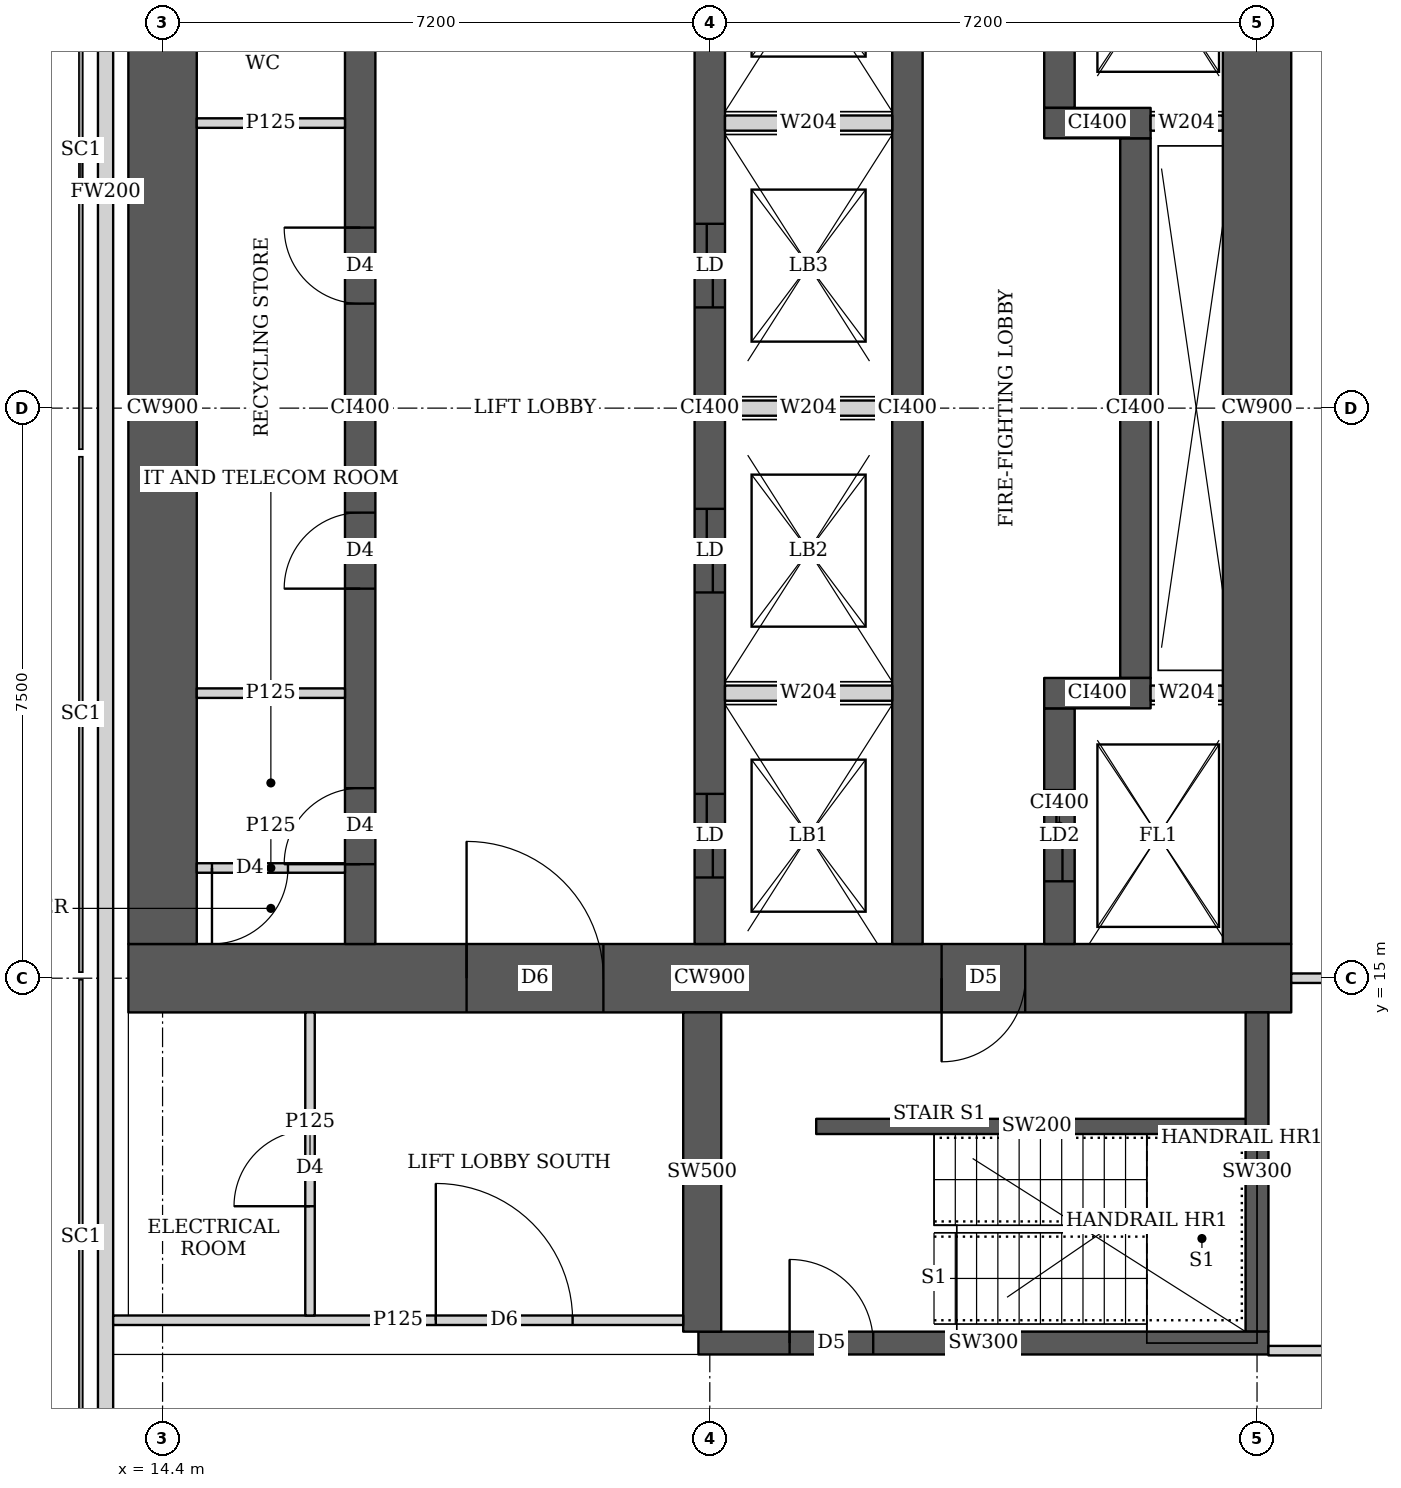
"""IFC4 building model, lengths in metres.
Left out: names, types, materials, properties, quantities, classifications, styles, units other than length and angle.
Written with IfcOpenShell. Run it as: python <this file> out.ifc"""

import sys

from ifc_helpers import new_model, si_unit, direction, frame, frame_2d, origin, place, context, subcontext, project, spatial, rectangle, extrude, element, fill, save


model = new_model("IFC4")
c1 = context("Model", 3, precision=1e-05, world=origin(), true_north=direction((0.0, 1.0)))
c2 = subcontext(c1, "Body", "Model", "MODEL_VIEW")
j1 = project(units=[si_unit("LENGTHUNIT", "METRE"), si_unit("PLANEANGLEUNIT", "RADIAN")], contexts=[c1])
p1 = place(None, origin())
s1 = spatial("IfcSite", under=j1, at=p1, CompositionType="ELEMENT")
p2 = place(p1, origin())
s2 = spatial("IfcBuilding", under=s1, at=p2, CompositionType="ELEMENT")
p3 = place(p2, frame((0.0, 0.0, 285.35)))
s3 = spatial("IfcBuildingStorey", under=s2, at=p3, CompositionType="ELEMENT", Elevation=285.35)
p4 = place(p3, frame((13.95, 15.0, 0.0), z_axis=(0.0, 0.0, 1.0), x_axis=(1.0, 0.0, 0.0)))
e1 = element("IfcWall", 1, at=p4, inside=s3, PredefinedType="SHEAR", context=c2, shape_type="SweptSolid", body=[
    extrude(rectangle(XDim=15.3, YDim=0.9, at=frame_2d((7.65, 0.0))), origin(), (0.0, 0.0, 1.0), 3.75),
])
p5 = place(p4, frame((4.45, 0.0, 0.0)))
e2 = element("IfcOpeningElement", 2, at=p5, cuts=e1, PredefinedType="OPENING", context=c2, shape_type="SweptSolid", body=[
    extrude(rectangle(XDim=1.8, YDim=2.1, at=frame_2d((0.9, 1.05))), frame((0.0, 0.46, 0.0), z_axis=(0.0, -1.0, 0.0), x_axis=(1.0, 0.0, 0.0)), (0.0, 0.0, 1.0), 0.92),
])
p6 = place(p4, frame((10.7, 0.0, 0.0)))
e3 = element("IfcOpeningElement", 3, at=p6, cuts=e1, PredefinedType="OPENING", context=c2, shape_type="SweptSolid", body=[
    extrude(rectangle(XDim=1.1, YDim=2.1, at=frame_2d((0.55, 1.05))), frame((0.0, 0.46, 0.0), z_axis=(0.0, -1.0, 0.0), x_axis=(1.0, 0.0, 0.0)), (0.0, 0.0, 1.0), 0.92),
])
for number, where, z_axis, x_axis in (
    (4, (14.4, 15.45, 0.0), (0.0, 0.0, 1.0), (0.0, 1.0, 0.0)),
    (5, (28.8, 15.45, 0.0), (0.0, 0.0, 1.0), (0.0, 1.0, 0.0)),
):
    element("IfcWall", number, at=place(p3, frame(where, z_axis=z_axis, x_axis=x_axis)), inside=s3, PredefinedType="SHEAR", context=c2, shape_type="SweptSolid", body=[
        extrude(rectangle(XDim=14.1, YDim=0.9, at=frame_2d((7.05, 0.0))), origin(), (0.0, 0.0, 1.0), 3.75),
    ])
p7 = place(p3, frame((17.0, 15.45, 0.0), z_axis=(0.0, 0.0, 1.0), x_axis=(0.0, 1.0, 0.0)))
e6 = element("IfcWall", 6, at=p7, inside=s3, PredefinedType="SHEAR", context=c2, shape_type="SweptSolid", body=[
    extrude(rectangle(XDim=14.1, YDim=0.4, at=frame_2d((7.05, 0.0))), origin(), (0.0, 0.0, 1.0), 3.75),
])
p8 = place(p7, frame((1.05, 0.0, 0.0)))
e7 = element("IfcOpeningElement", 7, at=p8, cuts=e6, PredefinedType="OPENING", context=c2, shape_type="SweptSolid", body=[
    extrude(rectangle(XDim=1.0, YDim=2.1, at=frame_2d((0.5, 1.05))), frame((0.0, 0.21, 0.0), z_axis=(0.0, -1.0, 0.0), x_axis=(1.0, 0.0, 0.0)), (0.0, 0.0, 1.0), 0.42),
])
p9 = place(p7, frame((4.675, 0.0, 0.0)))
e8 = element("IfcOpeningElement", 8, at=p9, cuts=e6, PredefinedType="OPENING", context=c2, shape_type="SweptSolid", body=[
    extrude(rectangle(XDim=1.0, YDim=2.1, at=frame_2d((0.5, 1.05))), frame((0.0, 0.21, 0.0), z_axis=(0.0, -1.0, 0.0), x_axis=(1.0, 0.0, 0.0)), (0.0, 0.0, 1.0), 0.42),
])
p10 = place(p7, frame((8.425, 0.0, 0.0)))
e9 = element("IfcOpeningElement", 9, at=p10, cuts=e6, PredefinedType="OPENING", context=c2, shape_type="SweptSolid", body=[
    extrude(rectangle(XDim=1.0, YDim=2.1, at=frame_2d((0.5, 1.05))), frame((0.0, 0.21, 0.0), z_axis=(0.0, -1.0, 0.0), x_axis=(1.0, 0.0, 0.0)), (0.0, 0.0, 1.0), 0.42),
])
p11 = place(p7, frame((12.175, 0.0, 0.0)))
e10 = element("IfcOpeningElement", 10, at=p11, cuts=e6, PredefinedType="OPENING", context=c2, shape_type="SweptSolid", body=[
    extrude(rectangle(XDim=1.0, YDim=2.1, at=frame_2d((0.5, 1.05))), frame((0.0, 0.21, 0.0), z_axis=(0.0, -1.0, 0.0), x_axis=(1.0, 0.0, 0.0)), (0.0, 0.0, 1.0), 0.42),
])
p12 = place(p3, frame((21.6, 15.45, 0.0), z_axis=(0.0, 0.0, 1.0), x_axis=(0.0, 1.0, 0.0)))
e11 = element("IfcWall", 11, at=p12, inside=s3, PredefinedType="SHEAR", context=c2, shape_type="SweptSolid", body=[
    extrude(rectangle(XDim=14.1, YDim=0.4, at=frame_2d((7.05, 0.0))), origin(), (0.0, 0.0, 1.0), 3.75),
])
p13 = place(p12, frame((0.875, 0.0, 0.0)))
e12 = element("IfcOpeningElement", 12, at=p13, cuts=e11, PredefinedType="OPENING", context=c2, shape_type="SweptSolid", body=[
    extrude(rectangle(XDim=1.1, YDim=2.1, at=frame_2d((0.55, 1.05))), frame((0.0, 0.21, 0.0), z_axis=(0.0, -1.0, 0.0), x_axis=(1.0, 0.0, 0.0)), (0.0, 0.0, 1.0), 0.42),
])
p14 = place(p12, frame((4.625, 0.0, 0.0)))
e13 = element("IfcOpeningElement", 13, at=p14, cuts=e11, PredefinedType="OPENING", context=c2, shape_type="SweptSolid", body=[
    extrude(rectangle(XDim=1.1, YDim=2.1, at=frame_2d((0.55, 1.05))), frame((0.0, 0.21, 0.0), z_axis=(0.0, -1.0, 0.0), x_axis=(1.0, 0.0, 0.0)), (0.0, 0.0, 1.0), 0.42),
])
p15 = place(p12, frame((8.375, 0.0, 0.0)))
e14 = element("IfcOpeningElement", 14, at=p15, cuts=e11, PredefinedType="OPENING", context=c2, shape_type="SweptSolid", body=[
    extrude(rectangle(XDim=1.1, YDim=2.1, at=frame_2d((0.55, 1.05))), frame((0.0, 0.21, 0.0), z_axis=(0.0, -1.0, 0.0), x_axis=(1.0, 0.0, 0.0)), (0.0, 0.0, 1.0), 0.42),
])
p16 = place(p12, frame((12.125, 0.0, 0.0)))
e15 = element("IfcOpeningElement", 15, at=p16, cuts=e11, PredefinedType="OPENING", context=c2, shape_type="SweptSolid", body=[
    extrude(rectangle(XDim=1.1, YDim=2.1, at=frame_2d((0.55, 1.05))), frame((0.0, 0.21, 0.0), z_axis=(0.0, -1.0, 0.0), x_axis=(1.0, 0.0, 0.0)), (0.0, 0.0, 1.0), 0.42),
])
p17 = place(p3, frame((24.2, 15.45, 0.0), z_axis=(0.0, 0.0, 1.0), x_axis=(0.0, 1.0, 0.0)))
e16 = element("IfcWall", 16, at=p17, inside=s3, PredefinedType="SHEAR", context=c2, shape_type="SweptSolid", body=[
    extrude(rectangle(XDim=14.1, YDim=0.4, at=frame_2d((7.05, 0.0))), origin(), (0.0, 0.0, 1.0), 3.75),
])
p18 = place(p3, frame((26.2, 15.45, 0.0), z_axis=(0.0, 0.0, 1.0), x_axis=(0.0, 1.0, 0.0)))
e17 = element("IfcWall", 17, at=p18, inside=s3, PredefinedType="SHEAR", context=c2, shape_type="SweptSolid", body=[
    extrude(rectangle(XDim=3.1, YDim=0.4, at=frame_2d((1.55, 0.0))), origin(), (0.0, 0.0, 1.0), 3.75),
])
p19 = place(p18, frame((0.825, 0.0, 0.0)))
e18 = element("IfcOpeningElement", 18, at=p19, cuts=e17, PredefinedType="OPENING", context=c2, shape_type="SweptSolid", body=[
    extrude(rectangle(XDim=1.2, YDim=2.1, at=frame_2d((0.6, 1.05))), frame((0.0, 0.21, 0.0), z_axis=(0.0, -1.0, 0.0), x_axis=(1.0, 0.0, 0.0)), (0.0, 0.0, 1.0), 0.42),
])
p20 = place(p3, frame((26.0, 18.75, 0.0), z_axis=(0.0, 0.0, 1.0), x_axis=(1.0, 0.0, 0.0)))
e19 = element("IfcWall", 19, at=p20, inside=s3, PredefinedType="SHEAR", context=c2, shape_type="SweptSolid", body=[
    extrude(rectangle(XDim=1.4, YDim=0.4, at=frame_2d((0.7, 0.0))), origin(), (0.0, 0.0, 1.0), 3.75),
])
p21 = place(p3, frame((27.2, 18.95, 0.0), z_axis=(0.0, 0.0, 1.0), x_axis=(0.0, 1.0, 0.0)))
e20 = element("IfcWall", 20, at=p21, inside=s3, PredefinedType="SHEAR", context=c2, shape_type="SweptSolid", body=[
    extrude(rectangle(XDim=7.1, YDim=0.4, at=frame_2d((3.55, 0.0))), origin(), (0.0, 0.0, 1.0), 3.75),
])
p22 = place(p3, frame((26.0, 26.25, 0.0), z_axis=(0.0, 0.0, 1.0), x_axis=(1.0, 0.0, 0.0)))
e21 = element("IfcWall", 21, at=p22, inside=s3, PredefinedType="SHEAR", context=c2, shape_type="SweptSolid", body=[
    extrude(rectangle(XDim=1.4, YDim=0.4, at=frame_2d((0.7, 0.0))), origin(), (0.0, 0.0, 1.0), 3.75),
])
p23 = place(p3, frame((26.2, 26.45, 0.0), z_axis=(0.0, 0.0, 1.0), x_axis=(0.0, 1.0, 0.0)))
e22 = element("IfcWall", 22, at=p23, inside=s3, PredefinedType="SHEAR", context=c2, shape_type="SweptSolid", body=[
    extrude(rectangle(XDim=3.1, YDim=0.4, at=frame_2d((1.55, 0.0))), origin(), (0.0, 0.0, 1.0), 3.75),
])
p24 = place(p23, frame((1.075, 0.0, 0.0)))
e23 = element("IfcOpeningElement", 23, at=p24, cuts=e22, PredefinedType="OPENING", context=c2, shape_type="SweptSolid", body=[
    extrude(rectangle(XDim=1.2, YDim=2.1, at=frame_2d((0.6, 1.05))), frame((0.0, 0.21, 0.0), z_axis=(0.0, -1.0, 0.0), x_axis=(1.0, 0.0, 0.0)), (0.0, 0.0, 1.0), 0.42),
])
p25 = place(p3, frame((21.45, 10.2, 0.0), z_axis=(0.0, 0.0, 1.0), x_axis=(1.0, 0.0, 0.0)))
e24 = element("IfcWall", 24, at=p25, inside=s3, PredefinedType="SHEAR", context=c2, shape_type="SweptSolid", body=[
    extrude(rectangle(XDim=7.5, YDim=0.3, at=frame_2d((3.75, 0.0))), origin(), (0.0, 0.0, 1.0), 3.75),
])
p26 = place(p25, frame((1.2, 0.0, 0.0)))
e25 = element("IfcOpeningElement", 25, at=p26, cuts=e24, PredefinedType="OPENING", context=c2, shape_type="SweptSolid", body=[
    extrude(rectangle(XDim=1.1, YDim=2.1, at=frame_2d((0.55, 1.05))), frame((0.0, 0.16, 0.0), z_axis=(0.0, -1.0, 0.0), x_axis=(1.0, 0.0, 0.0)), (0.0, 0.0, 1.0), 0.32),
])
p27 = place(p3, frame((21.5, 10.35, 0.0), z_axis=(0.0, 0.0, 1.0), x_axis=(0.0, 1.0, 0.0)))
e26 = element("IfcWall", 26, at=p27, inside=s3, PredefinedType="SHEAR", context=c2, shape_type="SweptSolid", body=[
    extrude(rectangle(XDim=4.2, YDim=0.5, at=frame_2d((2.1, 0.0))), origin(), (0.0, 0.0, 1.0), 3.75),
])
p28 = place(p3, frame((28.8, 10.35, 0.0), z_axis=(0.0, 0.0, 1.0), x_axis=(0.0, 1.0, 0.0)))
e27 = element("IfcWall", 27, at=p28, inside=s3, PredefinedType="SHEAR", context=c2, shape_type="SweptSolid", body=[
    extrude(rectangle(XDim=4.2, YDim=0.3, at=frame_2d((2.1, 0.0))), origin(), (0.0, 0.0, 1.0), 3.75),
])
p29 = place(p3, frame((13.65, 43.037, 0.0), z_axis=(0.0, 0.0, 1.0), x_axis=(0.0, -1.0, 0.0)))
e28 = element("IfcWall", 28, at=p29, inside=s3, PredefinedType="SOLIDWALL", context=c2, shape_type="SweptSolid", body=[
    extrude(rectangle(XDim=35.374, YDim=0.2, at=frame_2d((17.687, 0.0))), origin(), (0.0, 0.0, 1.0), 3.5),
])
p30 = place(p3, frame((13.75, 10.5, 0.0), z_axis=(0.0, 0.0, 1.0), x_axis=(1.0, 0.0, 0.0)))
e29 = element("IfcWall", 29, at=p30, inside=s3, PredefinedType="PARTITIONING", context=c2, shape_type="SweptSolid", body=[
    extrude(rectangle(XDim=7.5, YDim=0.125, at=frame_2d((3.75, 0.0))), origin(), (0.0, 0.0, 1.0), 3.5),
])
p31 = place(p30, frame((4.245, 0.0, 0.0)))
e30 = element("IfcOpeningElement", 30, at=p31, cuts=e29, PredefinedType="OPENING", context=c2, shape_type="SweptSolid", body=[
    extrude(rectangle(XDim=1.8, YDim=2.1, at=frame_2d((0.9, 1.05))), frame((0.0, 0.073, 0.0), z_axis=(0.0, -1.0, 0.0), x_axis=(1.0, 0.0, 0.0)), (0.0, 0.0, 1.0), 0.145),
])
p32 = place(p3, frame((16.34, 10.562, 0.0), z_axis=(0.0, 0.0, 1.0), x_axis=(0.0, 1.0, 0.0)))
e31 = element("IfcWall", 31, at=p32, inside=s3, PredefinedType="PARTITIONING", context=c2, shape_type="SweptSolid", body=[
    extrude(rectangle(XDim=3.988, YDim=0.125, at=frame_2d((1.994, 0.0))), origin(), (0.0, 0.0, 1.0), 3.5),
])
p33 = place(p32, frame((1.438, 0.0, 0.0)))
e32 = element("IfcOpeningElement", 32, at=p33, cuts=e31, PredefinedType="OPENING", context=c2, shape_type="SweptSolid", body=[
    extrude(rectangle(XDim=1.0, YDim=2.1, at=frame_2d((0.5, 1.05))), frame((0.0, 0.073, 0.0), z_axis=(0.0, -1.0, 0.0), x_axis=(1.0, 0.0, 0.0)), (0.0, 0.0, 1.0), 0.145),
])
p34 = place(p3, frame((28.95, 10.1, 0.0), z_axis=(0.0, 0.0, 1.0), x_axis=(1.0, 0.0, 0.0)))
e33 = element("IfcWall", 33, at=p34, inside=s3, PredefinedType="PARTITIONING", context=c2, shape_type="SweptSolid", body=[
    extrude(rectangle(XDim=9.188, YDim=0.125, at=frame_2d((4.594, 0.0))), origin(), (0.0, 0.0, 1.0), 3.5),
])
p35 = place(p3, frame((29.25, 15.0, 0.0), z_axis=(0.0, 0.0, 1.0), x_axis=(1.0, 0.0, 0.0)))
e34 = element("IfcWall", 34, at=p35, inside=s3, PredefinedType="PARTITIONING", context=c2, shape_type="SweptSolid", body=[
    extrude(rectangle(XDim=6.049, YDim=0.125, at=frame_2d((3.024, 0.0))), origin(), (0.0, 0.0, 1.0), 3.5),
])
p36 = place(p3, frame((14.85, 16.45, 0.0), z_axis=(0.0, 0.0, 1.0), x_axis=(1.0, 0.0, 0.0)))
e35 = element("IfcWall", 35, at=p36, inside=s3, PredefinedType="PARTITIONING", context=c2, shape_type="SweptSolid", body=[
    extrude(rectangle(XDim=1.95, YDim=0.125, at=frame_2d((0.975, 0.0))), origin(), (0.0, 0.0, 1.0), 3.5),
])
p37 = place(p36, frame((0.2, 0.0, 0.0)))
e36 = element("IfcOpeningElement", 36, at=p37, cuts=e35, PredefinedType="OPENING", context=c2, shape_type="SweptSolid", body=[
    extrude(rectangle(XDim=1.0, YDim=2.1, at=frame_2d((0.5, 1.05))), frame((0.0, 0.073, 0.0), z_axis=(0.0, -1.0, 0.0), x_axis=(1.0, 0.0, 0.0)), (0.0, 0.0, 1.0), 0.145),
])
for number, where, z_axis, x_axis in (
    (37, (14.85, 18.75, 0.0), (0.0, 0.0, 1.0), (1.0, 0.0, 0.0)),
    (38, (14.85, 26.25, 0.0), (0.0, 0.0, 1.0), (1.0, 0.0, 0.0)),
):
    element("IfcWall", number, at=place(p3, frame(where, z_axis=z_axis, x_axis=x_axis)), inside=s3, PredefinedType="PARTITIONING", context=c2, shape_type="SweptSolid", body=[
        extrude(rectangle(XDim=1.95, YDim=0.125, at=frame_2d((0.975, 0.0))), origin(), (0.0, 0.0, 1.0), 3.5),
    ])
p38 = place(p3, frame((23.0, 13.05, 0.0), z_axis=(0.0, 0.0, 1.0), x_axis=(1.0, 0.0, 0.0)))
e39 = element("IfcWall", 39, at=p38, inside=s3, PredefinedType="SHEAR", context=c2, shape_type="SweptSolid", body=[
    extrude(rectangle(XDim=5.8, YDim=0.2, at=frame_2d((2.9, 0.0))), origin(), (0.0, 0.0, 1.0), 3.75),
])
for number, where, z_axis, x_axis in (
    (40, (21.8, 18.75, 0.0), (0.0, 0.0, 1.0), (1.0, 0.0, 0.0)),
    (41, (21.8, 22.5, 0.0), (0.0, 0.0, 1.0), (1.0, 0.0, 0.0)),
    (42, (21.8, 26.25, 0.0), (0.0, 0.0, 1.0), (1.0, 0.0, 0.0)),
):
    element("IfcWall", number, at=place(p3, frame(where, z_axis=z_axis, x_axis=x_axis)), inside=s3, PredefinedType="SOLIDWALL", context=c2, shape_type="SweptSolid", body=[
        extrude(rectangle(XDim=2.2, YDim=0.2, at=frame_2d((1.1, 0.0))), origin(), (0.0, 0.0, 1.0), 3.5),
    ])
for number, where, z_axis, x_axis in (
    (43, (27.4, 18.75, 0.0), (0.0, 0.0, 1.0), (1.0, 0.0, 0.0)),
    (44, (27.4, 26.25, 0.0), (0.0, 0.0, 1.0), (1.0, 0.0, 0.0)),
):
    element("IfcWall", number, at=place(p3, frame(where, z_axis=z_axis, x_axis=x_axis)), inside=s3, PredefinedType="SOLIDWALL", context=c2, shape_type="SweptSolid", body=[
        extrude(rectangle(XDim=0.95, YDim=0.2, at=frame_2d((0.475, 0.0))), origin(), (0.0, 0.0, 1.0), 3.5),
    ])
p39 = place(p33, origin())
e45 = element("IfcDoor", 45, at=p39, inside=s3, OperationType="SINGLE_SWING_LEFT", PredefinedType="DOOR", context=c2, shape_type="SweptSolid", body=[
    extrude(rectangle(XDim=1.0, YDim=2.1, at=frame_2d((0.5, 1.05))), frame((0.0, 0.025, 0.0), z_axis=(0.0, -1.0, 0.0), x_axis=(1.0, 0.0, 0.0)), (0.0, 0.0, 1.0), 0.05),
])
fill(e32, e45)
p40 = place(p31, origin())
e46 = element("IfcDoor", 46, at=p40, inside=s3, OperationType="DOUBLE_DOOR_SINGLE_SWING", PredefinedType="DOOR", context=c2, shape_type="SweptSolid", body=[
    extrude(rectangle(XDim=1.8, YDim=2.1, at=frame_2d((0.9, 1.05))), frame((0.0, 0.025, 0.0), z_axis=(0.0, -1.0, 0.0), x_axis=(1.0, 0.0, 0.0)), (0.0, 0.0, 1.0), 0.05),
])
fill(e30, e46)
p41 = place(p37, origin())
e47 = element("IfcDoor", 47, at=p41, inside=s3, OperationType="SINGLE_SWING_RIGHT", PredefinedType="DOOR", context=c2, shape_type="SweptSolid", body=[
    extrude(rectangle(XDim=1.0, YDim=2.1, at=frame_2d((0.5, 1.05))), frame((0.0, 0.025, 0.0), z_axis=(0.0, -1.0, 0.0), x_axis=(1.0, 0.0, 0.0)), (0.0, 0.0, 1.0), 0.05),
])
fill(e36, e47)
p42 = place(p8, origin())
e48 = element("IfcDoor", 48, at=p42, inside=s3, OperationType="SINGLE_SWING_LEFT", PredefinedType="DOOR", context=c2, shape_type="SweptSolid", body=[
    extrude(rectangle(XDim=1.0, YDim=2.1, at=frame_2d((0.5, 1.05))), frame((0.0, 0.025, 0.0), z_axis=(0.0, -1.0, 0.0), x_axis=(1.0, 0.0, 0.0)), (0.0, 0.0, 1.0), 0.05),
])
fill(e7, e48)
p43 = place(p9, origin())
e49 = element("IfcDoor", 49, at=p43, inside=s3, OperationType="SINGLE_SWING_LEFT", PredefinedType="DOOR", context=c2, shape_type="SweptSolid", body=[
    extrude(rectangle(XDim=1.0, YDim=2.1, at=frame_2d((0.5, 1.05))), frame((0.0, 0.025, 0.0), z_axis=(0.0, -1.0, 0.0), x_axis=(1.0, 0.0, 0.0)), (0.0, 0.0, 1.0), 0.05),
])
fill(e8, e49)
p44 = place(p10, origin())
e50 = element("IfcDoor", 50, at=p44, inside=s3, OperationType="SINGLE_SWING_RIGHT", PredefinedType="DOOR", context=c2, shape_type="SweptSolid", body=[
    extrude(rectangle(XDim=1.0, YDim=2.1, at=frame_2d((0.5, 1.05))), frame((0.0, 0.025, 0.0), z_axis=(0.0, -1.0, 0.0), x_axis=(1.0, 0.0, 0.0)), (0.0, 0.0, 1.0), 0.05),
])
fill(e9, e50)
p45 = place(p5, origin())
e51 = element("IfcDoor", 51, at=p45, inside=s3, OperationType="DOUBLE_DOOR_SINGLE_SWING", PredefinedType="DOOR", context=c2, shape_type="SweptSolid", body=[
    extrude(rectangle(XDim=1.8, YDim=2.1, at=frame_2d((0.9, 1.05))), frame((0.0, 0.025, 0.0), z_axis=(0.0, -1.0, 0.0), x_axis=(1.0, 0.0, 0.0)), (0.0, 0.0, 1.0), 0.05),
])
fill(e2, e51)
p46 = place(p6, origin())
e52 = element("IfcDoor", 52, at=p46, inside=s3, OperationType="SINGLE_SWING_RIGHT", PredefinedType="DOOR", context=c2, shape_type="SweptSolid", body=[
    extrude(rectangle(XDim=1.1, YDim=2.1, at=frame_2d((0.55, 1.05))), frame((0.0, 0.025, 0.0), z_axis=(0.0, -1.0, 0.0), x_axis=(1.0, 0.0, 0.0)), (0.0, 0.0, 1.0), 0.05),
])
fill(e3, e52)
p47 = place(p19, origin())
e53 = element("IfcDoor", 53, at=p47, inside=s3, OperationType="DOUBLE_DOOR_SLIDING", PredefinedType="DOOR", context=c2, shape_type="SweptSolid", body=[
    extrude(rectangle(XDim=1.2, YDim=2.1, at=frame_2d((0.6, 1.05))), frame((0.0, 0.025, 0.0), z_axis=(0.0, -1.0, 0.0), x_axis=(1.0, 0.0, 0.0)), (0.0, 0.0, 1.0), 0.05),
])
fill(e18, e53)
p48 = place(p13, origin())
e54 = element("IfcDoor", 54, at=p48, inside=s3, OperationType="DOUBLE_DOOR_SLIDING", PredefinedType="DOOR", context=c2, shape_type="SweptSolid", body=[
    extrude(rectangle(XDim=1.1, YDim=2.1, at=frame_2d((0.55, 1.05))), frame((0.0, 0.025, 0.0), z_axis=(0.0, -1.0, 0.0), x_axis=(1.0, 0.0, 0.0)), (0.0, 0.0, 1.0), 0.05),
])
fill(e12, e54)
p49 = place(p14, origin())
e55 = element("IfcDoor", 55, at=p49, inside=s3, OperationType="DOUBLE_DOOR_SLIDING", PredefinedType="DOOR", context=c2, shape_type="SweptSolid", body=[
    extrude(rectangle(XDim=1.1, YDim=2.1, at=frame_2d((0.55, 1.05))), frame((0.0, 0.025, 0.0), z_axis=(0.0, -1.0, 0.0), x_axis=(1.0, 0.0, 0.0)), (0.0, 0.0, 1.0), 0.05),
])
fill(e13, e55)
p50 = place(p15, origin())
e56 = element("IfcDoor", 56, at=p50, inside=s3, OperationType="DOUBLE_DOOR_SLIDING", PredefinedType="DOOR", context=c2, shape_type="SweptSolid", body=[
    extrude(rectangle(XDim=1.1, YDim=2.1, at=frame_2d((0.55, 1.05))), frame((0.0, 0.025, 0.0), z_axis=(0.0, -1.0, 0.0), x_axis=(1.0, 0.0, 0.0)), (0.0, 0.0, 1.0), 0.05),
])
fill(e14, e56)
p51 = place(p26, origin())
e57 = element("IfcDoor", 57, at=p51, inside=s3, OperationType="SINGLE_SWING_LEFT", PredefinedType="DOOR", context=c2, shape_type="SweptSolid", body=[
    extrude(rectangle(XDim=1.1, YDim=2.1, at=frame_2d((0.55, 1.05))), frame((0.0, 0.025, 0.0), z_axis=(0.0, -1.0, 0.0), x_axis=(1.0, 0.0, 0.0)), (0.0, 0.0, 1.0), 0.05),
])
fill(e25, e57)
save(model, sys.argv[1])
